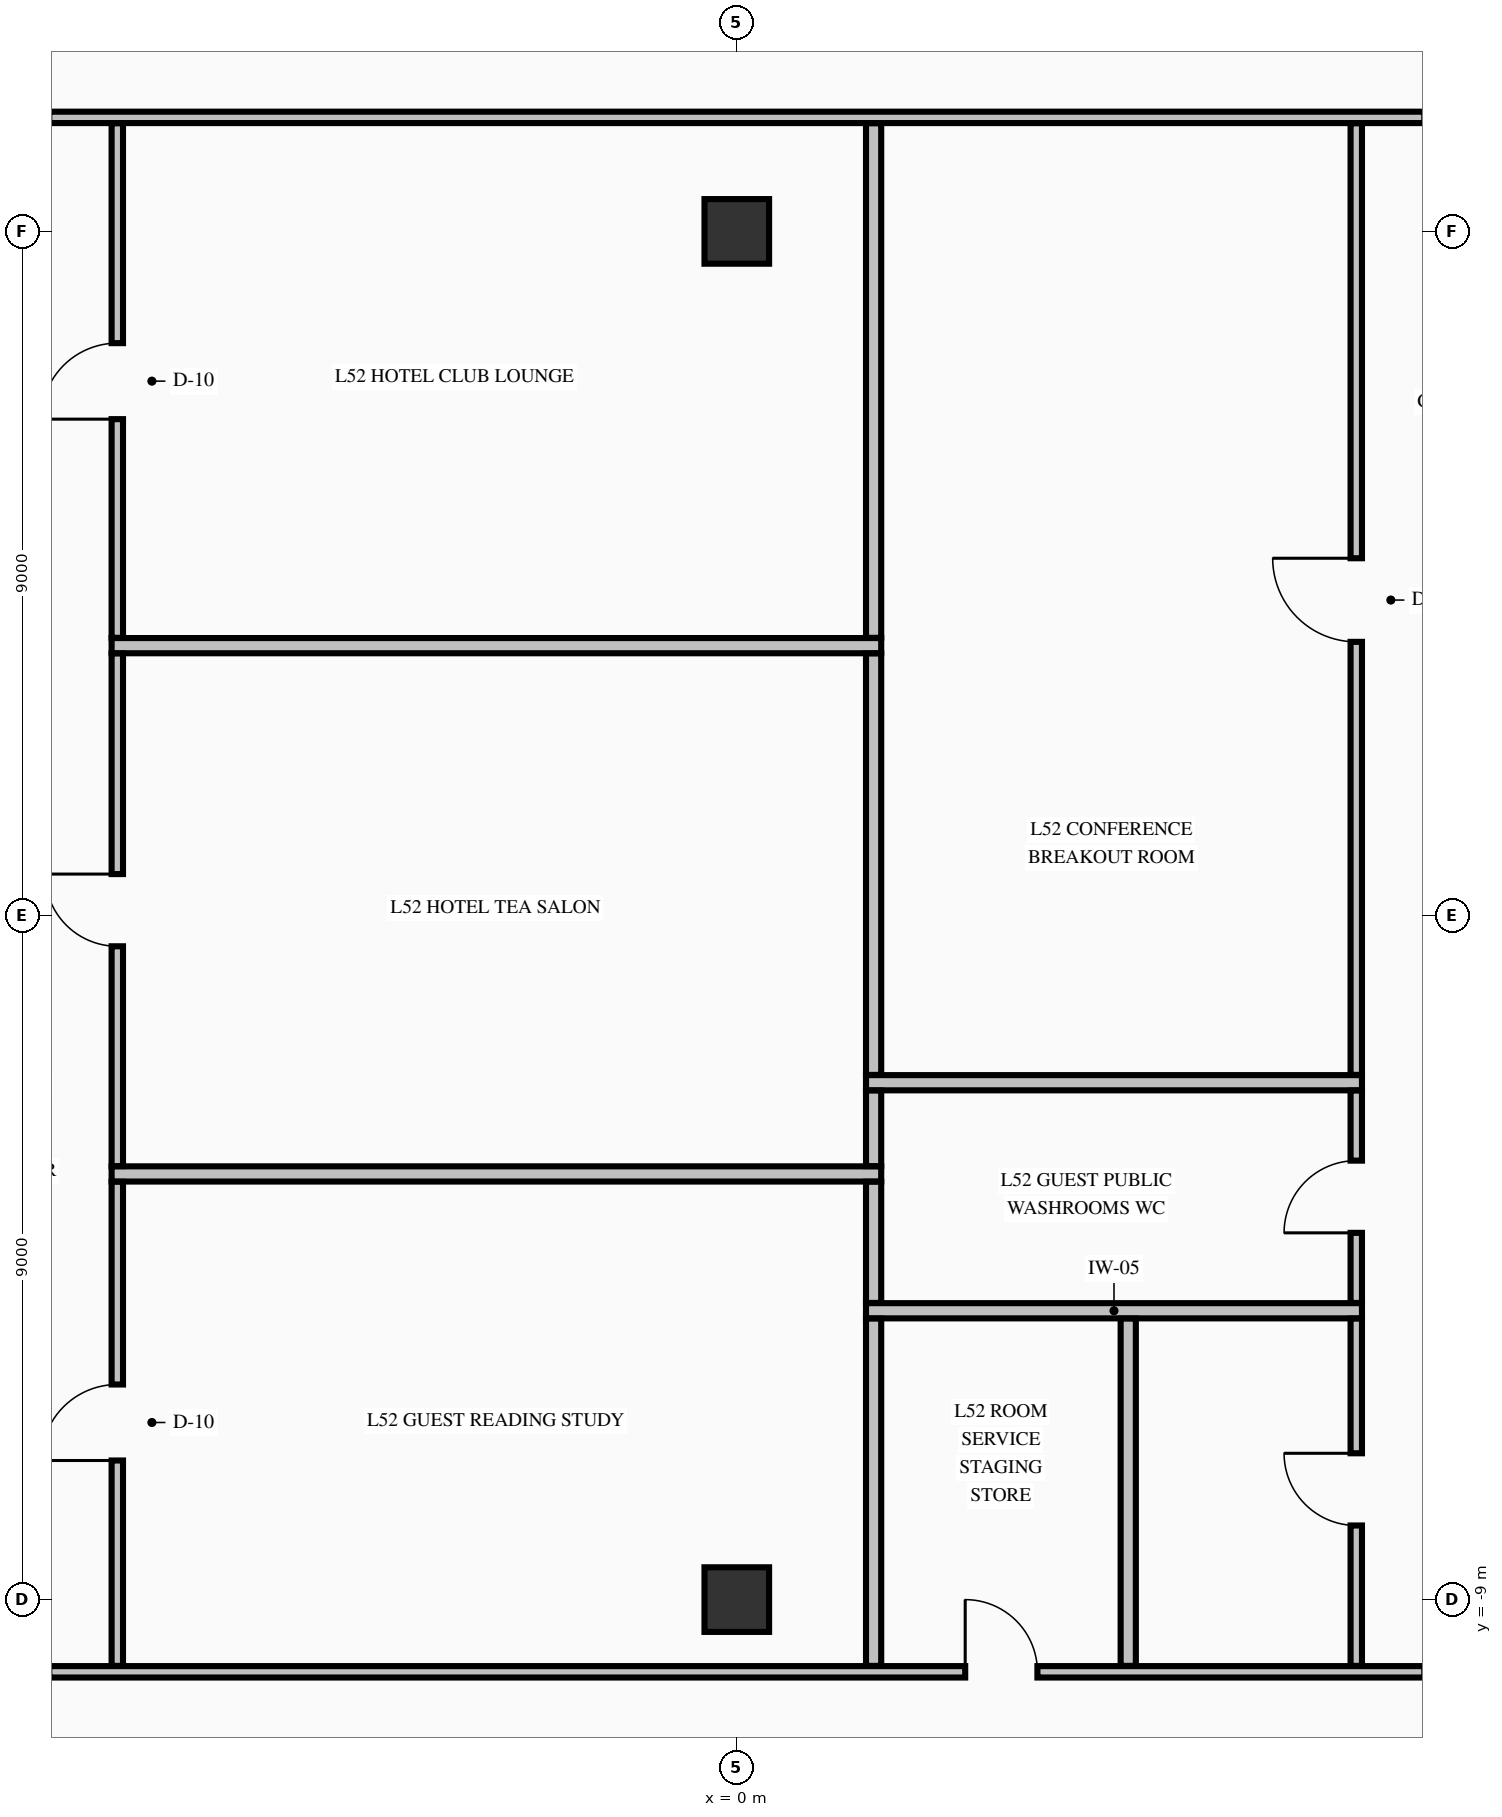
"""IFC4 building model, lengths in metres.
Left out: names, types, materials, properties, quantities, classifications, styles, units other than length and angle.
Written with IfcOpenShell. Run it as: python <this file> out.ifc"""

import sys

from ifc_helpers import new_model, si_unit, direction, frame, frame_2d, origin, origin_2d, place, context, subcontext, project, spatial, rectangle, extrude, element, fill, save


model = new_model("IFC4")
c1 = context("Model", 3, precision=1e-05, world=origin(), true_north=direction((0.0, 1.0)))
c2 = subcontext(c1, "Body", "Model", "MODEL_VIEW")
j1 = project(units=[si_unit("LENGTHUNIT", "METRE"), si_unit("PLANEANGLEUNIT", "RADIAN")], contexts=[c1])
p1 = place(None, origin())
s1 = spatial("IfcSite", under=j1, at=p1, CompositionType="ELEMENT")
p2 = place(p1, origin())
s2 = spatial("IfcBuilding", under=s1, at=p2, CompositionType="ELEMENT")
p3 = place(p2, frame((0.0, 0.0, 201.66)))
s3 = spatial("IfcBuildingStorey", under=s2, at=p3, CompositionType="ELEMENT", Elevation=201.66)
for number, where, z_axis, x_axis in (
    (1, (0.0, -9.0, -0.25), (0.0, 0.0, 1.0), (1.0, 0.0, 0.0)),
    (2, (0.0, 9.0, -0.25), (0.0, 0.0, 1.0), (1.0, 0.0, 0.0)),
):
    element("IfcColumn", number, at=place(p3, frame(where, z_axis=z_axis, x_axis=x_axis)), inside=s3, PredefinedType="COLUMN", context=c2, shape_type="SweptSolid", body=[
        extrude(rectangle(XDim=0.85, YDim=0.85, at=origin_2d()), origin(), (0.0, 0.0, 1.0), 3.4),
    ])
p4 = place(p3, frame((-10.569, -9.95, 0.0), z_axis=(0.0, 0.0, 1.0), x_axis=(1.0, 0.0, 0.0)))
e3 = element("IfcWall", 3, at=p4, inside=s3, PredefinedType="PARTITIONING", context=c2, shape_type="SweptSolid", body=[
    extrude(rectangle(XDim=21.138, YDim=0.15, at=frame_2d((10.569, 0.0))), origin(), (0.0, 0.0, 1.0), 3.15),
])
p5 = place(p4, frame((0.474, 0.0, 0.0)))
e4 = element("IfcOpeningElement", 4, at=p5, cuts=e3, PredefinedType="OPENING", context=c2, shape_type="SweptSolid", body=[
    extrude(rectangle(XDim=1.05, YDim=2.15, at=frame_2d((0.525, 1.075))), frame((0.0, 0.085, 0.0), z_axis=(0.0, -1.0, 0.0), x_axis=(1.0, 0.0, 0.0)), (0.0, 0.0, 1.0), 0.17),
])
p6 = place(p4, frame((19.614, 0.0, 0.0)))
e5 = element("IfcOpeningElement", 5, at=p6, cuts=e3, PredefinedType="OPENING", context=c2, shape_type="SweptSolid", body=[
    extrude(rectangle(XDim=1.05, YDim=2.15, at=frame_2d((0.525, 1.075))), frame((0.0, 0.085, 0.0), z_axis=(0.0, -1.0, 0.0), x_axis=(1.0, 0.0, 0.0)), (0.0, 0.0, 1.0), 0.17),
])
p7 = place(p4, frame((13.574, 0.0, 0.0)))
e6 = element("IfcOpeningElement", 6, at=p7, cuts=e3, PredefinedType="OPENING", context=c2, shape_type="SweptSolid", body=[
    extrude(rectangle(XDim=0.95, YDim=2.15, at=frame_2d((0.475, 1.075))), frame((0.0, 0.085, 0.0), z_axis=(0.0, -1.0, 0.0), x_axis=(1.0, 0.0, 0.0)), (0.0, 0.0, 1.0), 0.17),
])
p8 = place(p3, frame((1.7, -5.2, 0.0), z_axis=(0.0, 0.0, 1.0), x_axis=(1.0, 0.0, 0.0)))
e7 = element("IfcWall", 7, at=p8, inside=s3, PredefinedType="PARTITIONING", context=c2, shape_type="SweptSolid", body=[
    extrude(rectangle(XDim=6.525, YDim=0.2, at=frame_2d((3.263, 0.0))), origin(), (0.0, 0.0, 1.0), 3.15),
])
p9 = place(p3, frame((-8.225, -3.4, 0.0), z_axis=(0.0, 0.0, 1.0), x_axis=(1.0, 0.0, 0.0)))
e8 = element("IfcWall", 8, at=p9, inside=s3, PredefinedType="PARTITIONING", context=c2, shape_type="SweptSolid", body=[
    extrude(rectangle(XDim=10.125, YDim=0.2, at=frame_2d((5.062, 0.0))), origin(), (0.0, 0.0, 1.0), 3.15),
])
p10 = place(p3, frame((1.7, -2.2, 0.0), z_axis=(0.0, 0.0, 1.0), x_axis=(1.0, 0.0, 0.0)))
e9 = element("IfcWall", 9, at=p10, inside=s3, PredefinedType="PARTITIONING", context=c2, shape_type="SweptSolid", body=[
    extrude(rectangle(XDim=6.525, YDim=0.2, at=frame_2d((3.263, 0.0))), origin(), (0.0, 0.0, 1.0), 3.15),
])
p11 = place(p3, frame((-8.225, 3.55, 0.0), z_axis=(0.0, 0.0, 1.0), x_axis=(1.0, 0.0, 0.0)))
e10 = element("IfcWall", 10, at=p11, inside=s3, PredefinedType="PARTITIONING", context=c2, shape_type="SweptSolid", body=[
    extrude(rectangle(XDim=10.125, YDim=0.2, at=frame_2d((5.062, 0.0))), origin(), (0.0, 0.0, 1.0), 3.15),
])
p12 = place(p3, frame((-10.569, 10.5, 0.0), z_axis=(0.0, 0.0, 1.0), x_axis=(1.0, 0.0, 0.0)))
e11 = element("IfcWall", 11, at=p12, inside=s3, PredefinedType="PARTITIONING", context=c2, shape_type="SweptSolid", body=[
    extrude(rectangle(XDim=21.138, YDim=0.15, at=frame_2d((10.569, 0.0))), origin(), (0.0, 0.0, 1.0), 3.15),
])
p13 = place(p12, frame((0.474, 0.0, 0.0)))
e12 = element("IfcOpeningElement", 12, at=p13, cuts=e11, PredefinedType="OPENING", context=c2, shape_type="SweptSolid", body=[
    extrude(rectangle(XDim=1.05, YDim=2.15, at=frame_2d((0.525, 1.075))), frame((0.0, 0.085, 0.0), z_axis=(0.0, -1.0, 0.0), x_axis=(1.0, 0.0, 0.0)), (0.0, 0.0, 1.0), 0.17),
])
p14 = place(p12, frame((19.614, 0.0, 0.0)))
e13 = element("IfcOpeningElement", 13, at=p14, cuts=e11, PredefinedType="OPENING", context=c2, shape_type="SweptSolid", body=[
    extrude(rectangle(XDim=1.05, YDim=2.15, at=frame_2d((0.525, 1.075))), frame((0.0, 0.085, 0.0), z_axis=(0.0, -1.0, 0.0), x_axis=(1.0, 0.0, 0.0)), (0.0, 0.0, 1.0), 0.17),
])
p15 = place(p3, frame((-8.15, -9.872, 0.0), z_axis=(0.0, 0.0, 1.0), x_axis=(0.0, 1.0, 0.0)))
e14 = element("IfcWall", 14, at=p15, inside=s3, PredefinedType="PARTITIONING", context=c2, shape_type="SweptSolid", body=[
    extrude(rectangle(XDim=6.369, YDim=0.15, at=frame_2d((3.185, 0.0))), origin(), (0.0, 0.0, 1.0), 3.15),
])
p16 = place(p15, frame((2.702, 0.0, 0.0)))
e15 = element("IfcOpeningElement", 15, at=p16, cuts=e14, PredefinedType="OPENING", context=c2, shape_type="SweptSolid", body=[
    extrude(rectangle(XDim=1.0, YDim=2.15, at=frame_2d((0.5, 1.075))), frame((0.0, 0.085, 0.0), z_axis=(0.0, -1.0, 0.0), x_axis=(1.0, 0.0, 0.0)), (0.0, 0.0, 1.0), 0.17),
])
p17 = place(p3, frame((-8.15, -3.297, 0.0), z_axis=(0.0, 0.0, 1.0), x_axis=(0.0, 1.0, 0.0)))
e16 = element("IfcWall", 16, at=p17, inside=s3, PredefinedType="PARTITIONING", context=c2, shape_type="SweptSolid", body=[
    extrude(rectangle(XDim=6.744, YDim=0.15, at=frame_2d((3.372, 0.0))), origin(), (0.0, 0.0, 1.0), 3.15),
])
p18 = place(p17, frame((2.892, 0.0, 0.0)))
e17 = element("IfcOpeningElement", 17, at=p18, cuts=e16, PredefinedType="OPENING", context=c2, shape_type="SweptSolid", body=[
    extrude(rectangle(XDim=0.95, YDim=2.15, at=frame_2d((0.475, 1.075))), frame((0.0, 0.085, 0.0), z_axis=(0.0, -1.0, 0.0), x_axis=(1.0, 0.0, 0.0)), (0.0, 0.0, 1.0), 0.17),
])
p19 = place(p3, frame((-8.15, 3.653, 0.0), z_axis=(0.0, 0.0, 1.0), x_axis=(0.0, 1.0, 0.0)))
e18 = element("IfcWall", 18, at=p19, inside=s3, PredefinedType="PARTITIONING", context=c2, shape_type="SweptSolid", body=[
    extrude(rectangle(XDim=6.769, YDim=0.15, at=frame_2d((3.385, 0.0))), origin(), (0.0, 0.0, 1.0), 3.15),
])
p20 = place(p19, frame((2.877, 0.0, 0.0)))
e19 = element("IfcOpeningElement", 19, at=p20, cuts=e18, PredefinedType="OPENING", context=c2, shape_type="SweptSolid", body=[
    extrude(rectangle(XDim=1.0, YDim=2.15, at=frame_2d((0.5, 1.075))), frame((0.0, 0.085, 0.0), z_axis=(0.0, -1.0, 0.0), x_axis=(1.0, 0.0, 0.0)), (0.0, 0.0, 1.0), 0.17),
])
p21 = place(p3, frame((1.8, -9.872, 0.0), z_axis=(0.0, 0.0, 1.0), x_axis=(0.0, 1.0, 0.0)))
e20 = element("IfcWall", 20, at=p21, inside=s3, PredefinedType="PARTITIONING", context=c2, shape_type="SweptSolid", body=[
    extrude(rectangle(XDim=4.569, YDim=0.2, at=frame_2d((2.285, 0.0))), origin(), (0.0, 0.0, 1.0), 3.15),
])
p22 = place(p3, frame((1.8, -5.097, 0.0), z_axis=(0.0, 0.0, 1.0), x_axis=(0.0, 1.0, 0.0)))
e21 = element("IfcWall", 21, at=p22, inside=s3, PredefinedType="PARTITIONING", context=c2, shape_type="SweptSolid", body=[
    extrude(rectangle(XDim=1.594, YDim=0.2, at=frame_2d((0.797, 0.0))), origin(), (0.0, 0.0, 1.0), 3.15),
])
p23 = place(p3, frame((1.8, -3.297, 0.0), z_axis=(0.0, 0.0, 1.0), x_axis=(0.0, 1.0, 0.0)))
e22 = element("IfcWall", 22, at=p23, inside=s3, PredefinedType="PARTITIONING", context=c2, shape_type="SweptSolid", body=[
    extrude(rectangle(XDim=0.994, YDim=0.2, at=frame_2d((0.497, 0.0))), origin(), (0.0, 0.0, 1.0), 3.15),
])
p24 = place(p3, frame((1.8, -2.097, 0.0), z_axis=(0.0, 0.0, 1.0), x_axis=(0.0, 1.0, 0.0)))
e23 = element("IfcWall", 23, at=p24, inside=s3, PredefinedType="PARTITIONING", context=c2, shape_type="SweptSolid", body=[
    extrude(rectangle(XDim=5.544, YDim=0.2, at=frame_2d((2.772, 0.0))), origin(), (0.0, 0.0, 1.0), 3.15),
])
p25 = place(p3, frame((1.8, 3.653, 0.0), z_axis=(0.0, 0.0, 1.0), x_axis=(0.0, 1.0, 0.0)))
e24 = element("IfcWall", 24, at=p25, inside=s3, PredefinedType="PARTITIONING", context=c2, shape_type="SweptSolid", body=[
    extrude(rectangle(XDim=6.769, YDim=0.2, at=frame_2d((3.385, 0.0))), origin(), (0.0, 0.0, 1.0), 3.15),
])
p26 = place(p3, frame((5.15, -9.872, 0.0), z_axis=(0.0, 0.0, 1.0), x_axis=(0.0, 1.0, 0.0)))
e25 = element("IfcWall", 25, at=p26, inside=s3, PredefinedType="PARTITIONING", context=c2, shape_type="SweptSolid", body=[
    extrude(rectangle(XDim=4.569, YDim=0.2, at=frame_2d((2.285, 0.0))), origin(), (0.0, 0.0, 1.0), 3.15),
])
p27 = place(p3, frame((8.15, -9.872, 0.0), z_axis=(0.0, 0.0, 1.0), x_axis=(0.0, 1.0, 0.0)))
e26 = element("IfcWall", 26, at=p27, inside=s3, PredefinedType="PARTITIONING", context=c2, shape_type="SweptSolid", body=[
    extrude(rectangle(XDim=4.569, YDim=0.15, at=frame_2d((2.285, 0.0))), origin(), (0.0, 0.0, 1.0), 3.15),
])
p28 = place(p27, frame((1.847, 0.0, 0.0)))
e27 = element("IfcOpeningElement", 27, at=p28, cuts=e26, PredefinedType="OPENING", context=c2, shape_type="SweptSolid", body=[
    extrude(rectangle(XDim=0.95, YDim=2.15, at=frame_2d((0.475, 1.075))), frame((0.0, 0.085, 0.0), z_axis=(0.0, -1.0, 0.0), x_axis=(1.0, 0.0, 0.0)), (0.0, 0.0, 1.0), 0.17),
])
p29 = place(p3, frame((8.15, -5.097, 0.0), z_axis=(0.0, 0.0, 1.0), x_axis=(0.0, 1.0, 0.0)))
e28 = element("IfcWall", 28, at=p29, inside=s3, PredefinedType="PARTITIONING", context=c2, shape_type="SweptSolid", body=[
    extrude(rectangle(XDim=2.794, YDim=0.15, at=frame_2d((1.397, 0.0))), origin(), (0.0, 0.0, 1.0), 3.15),
])
p30 = place(p29, frame((0.922, 0.0, 0.0)))
e29 = element("IfcOpeningElement", 29, at=p30, cuts=e28, PredefinedType="OPENING", context=c2, shape_type="SweptSolid", body=[
    extrude(rectangle(XDim=0.95, YDim=2.15, at=frame_2d((0.475, 1.075))), frame((0.0, 0.085, 0.0), z_axis=(0.0, -1.0, 0.0), x_axis=(1.0, 0.0, 0.0)), (0.0, 0.0, 1.0), 0.17),
])
p31 = place(p3, frame((8.15, -2.097, 0.0), z_axis=(0.0, 0.0, 1.0), x_axis=(0.0, 1.0, 0.0)))
e30 = element("IfcWall", 30, at=p31, inside=s3, PredefinedType="PARTITIONING", context=c2, shape_type="SweptSolid", body=[
    extrude(rectangle(XDim=12.519, YDim=0.15, at=frame_2d((6.26, 0.0))), origin(), (0.0, 0.0, 1.0), 3.15),
])
p32 = place(p31, frame((5.697, 0.0, 0.0)))
e31 = element("IfcOpeningElement", 31, at=p32, cuts=e30, PredefinedType="OPENING", context=c2, shape_type="SweptSolid", body=[
    extrude(rectangle(XDim=1.1, YDim=2.15, at=frame_2d((0.55, 1.075))), frame((0.0, 0.085, 0.0), z_axis=(0.0, -1.0, 0.0), x_axis=(1.0, 0.0, 0.0)), (0.0, 0.0, 1.0), 0.17),
])
p33 = place(p20, origin())
e32 = element("IfcDoor", 32, at=p33, inside=s3, OperationType="SINGLE_SWING_LEFT", PredefinedType="DOOR", context=c2, shape_type="SweptSolid", body=[
    extrude(rectangle(XDim=1.0, YDim=2.15, at=frame_2d((0.5, 1.075))), frame((0.0, 0.025, 0.0), z_axis=(0.0, -1.0, 0.0), x_axis=(1.0, 0.0, 0.0)), (0.0, 0.0, 1.0), 0.05),
])
fill(e19, e32)
p34 = place(p18, origin())
e33 = element("IfcDoor", 33, at=p34, inside=s3, OperationType="SINGLE_SWING_RIGHT", PredefinedType="DOOR", context=c2, shape_type="SweptSolid", body=[
    extrude(rectangle(XDim=0.95, YDim=2.15, at=frame_2d((0.475, 1.075))), frame((0.0, 0.025, 0.0), z_axis=(0.0, -1.0, 0.0), x_axis=(1.0, 0.0, 0.0)), (0.0, 0.0, 1.0), 0.05),
])
fill(e17, e33)
p35 = place(p16, origin())
e34 = element("IfcDoor", 34, at=p35, inside=s3, OperationType="SINGLE_SWING_LEFT", PredefinedType="DOOR", context=c2, shape_type="SweptSolid", body=[
    extrude(rectangle(XDim=1.0, YDim=2.15, at=frame_2d((0.5, 1.075))), frame((0.0, 0.025, 0.0), z_axis=(0.0, -1.0, 0.0), x_axis=(1.0, 0.0, 0.0)), (0.0, 0.0, 1.0), 0.05),
])
fill(e15, e34)
p36 = place(p32, origin())
e35 = element("IfcDoor", 35, at=p36, inside=s3, OperationType="SINGLE_SWING_RIGHT", PredefinedType="DOOR", context=c2, shape_type="SweptSolid", body=[
    extrude(rectangle(XDim=1.1, YDim=2.15, at=frame_2d((0.55, 1.075))), frame((0.0, 0.025, 0.0), z_axis=(0.0, -1.0, 0.0), x_axis=(1.0, 0.0, 0.0)), (0.0, 0.0, 1.0), 0.05),
])
fill(e31, e35)
p37 = place(p30, origin())
e36 = element("IfcDoor", 36, at=p37, inside=s3, OperationType="SINGLE_SWING_LEFT", PredefinedType="DOOR", context=c2, shape_type="SweptSolid", body=[
    extrude(rectangle(XDim=0.95, YDim=2.15, at=frame_2d((0.475, 1.075))), frame((0.0, 0.025, 0.0), z_axis=(0.0, -1.0, 0.0), x_axis=(1.0, 0.0, 0.0)), (0.0, 0.0, 1.0), 0.05),
])
fill(e29, e36)
p38 = place(p28, origin())
e37 = element("IfcDoor", 37, at=p38, inside=s3, OperationType="SINGLE_SWING_RIGHT", PredefinedType="DOOR", context=c2, shape_type="SweptSolid", body=[
    extrude(rectangle(XDim=0.95, YDim=2.15, at=frame_2d((0.475, 1.075))), frame((0.0, 0.025, 0.0), z_axis=(0.0, -1.0, 0.0), x_axis=(1.0, 0.0, 0.0)), (0.0, 0.0, 1.0), 0.05),
])
fill(e27, e37)
p39 = place(p7, origin())
e38 = element("IfcDoor", 38, at=p39, inside=s3, OperationType="SINGLE_SWING_LEFT", PredefinedType="DOOR", context=c2, shape_type="SweptSolid", body=[
    extrude(rectangle(XDim=0.95, YDim=2.15, at=frame_2d((0.475, 1.075))), frame((0.0, 0.025, 0.0), z_axis=(0.0, -1.0, 0.0), x_axis=(1.0, 0.0, 0.0)), (0.0, 0.0, 1.0), 0.05),
])
fill(e6, e38)
save(model, sys.argv[1])
